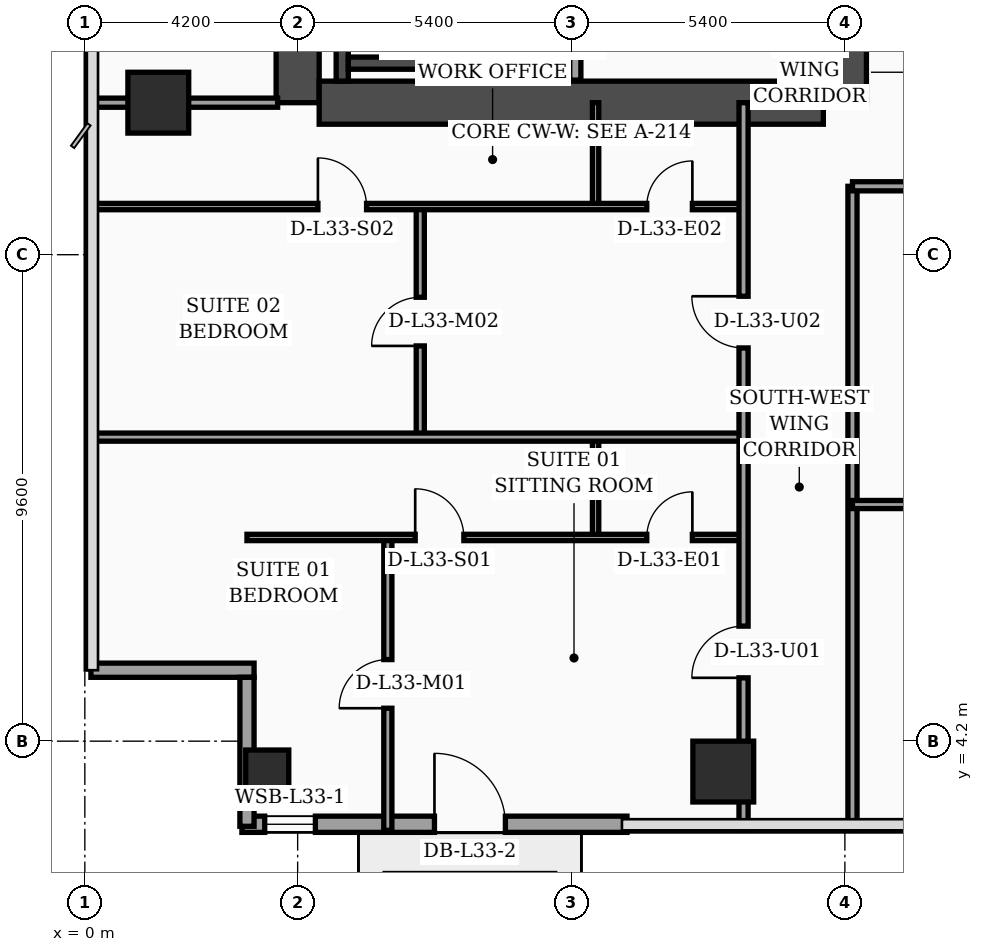
"""IFC4 building model, lengths in metres.
Left out: names, types, materials, properties, quantities, classifications, styles, units other than length and angle.
Written with IfcOpenShell. Run it as: python <this file> out.ifc"""

import sys

from ifc_helpers import new_model, si_unit, direction, frame, frame_2d, origin, origin_2d, place, context, subcontext, project, spatial, rectangle, hollow_rectangle, extrude, element, fill, save


model = new_model("IFC4")
c1 = context("Model", 3, precision=1e-05, world=origin(), true_north=direction((0.0, 1.0)))
c2 = subcontext(c1, "Body", "Model", "MODEL_VIEW")
j1 = project(units=[si_unit("LENGTHUNIT", "METRE"), si_unit("PLANEANGLEUNIT", "RADIAN")], contexts=[c1])
p1 = place(None, origin())
s1 = spatial("IfcSite", under=j1, at=p1, CompositionType="ELEMENT")
p2 = place(p1, origin())
s2 = spatial("IfcBuilding", under=s1, at=p2, CompositionType="ELEMENT")
p3 = place(p2, frame((0.0, 0.0, 135.4)))
s3 = spatial("IfcBuildingStorey", under=s2, at=p3, CompositionType="ELEMENT", Elevation=135.4)
p4 = place(p3, frame((4.2, 16.8, 0.0), z_axis=(0.0, 0.0, 1.0), x_axis=(0.0, 1.0, 0.0)))
e1 = element("IfcWall", 1, at=p4, inside=s3, PredefinedType="SHEAR", context=c2, shape_type="SweptSolid", body=[
    extrude(rectangle(XDim=21.6, YDim=0.85, at=frame_2d((10.8, 0.0))), origin(), (0.0, 0.0, 1.0), 3.52),
])
p5 = place(p3, frame((15.0, 16.8, 0.0), z_axis=(0.0, 0.0, 1.0), x_axis=(0.0, 1.0, 0.0)))
e2 = element("IfcWall", 2, at=p5, inside=s3, PredefinedType="SHEAR", context=c2, shape_type="SweptSolid", body=[
    extrude(rectangle(XDim=21.6, YDim=0.85, at=frame_2d((10.8, 0.0))), origin(), (0.0, 0.0, 1.0), 3.52),
])
p6 = place(p5, frame((8.65, 0.0, 0.0)))
e3 = element("IfcOpeningElement", 3, at=p6, cuts=e2, PredefinedType="OPENING", context=c2, shape_type="SweptSolid", body=[
    extrude(rectangle(XDim=1.1, YDim=2.2, at=frame_2d((0.55, 1.1))), frame((0.0, 0.435, 0.0), z_axis=(0.0, -1.0, 0.0), x_axis=(1.0, 0.0, 0.0)), (0.0, 0.0, 1.0), 0.87),
])
p7 = place(p5, frame((10.85, 0.0, 0.0)))
e4 = element("IfcOpeningElement", 4, at=p7, cuts=e2, PredefinedType="OPENING", context=c2, shape_type="SweptSolid", body=[
    extrude(rectangle(XDim=1.1, YDim=2.2, at=frame_2d((0.55, 1.1))), frame((0.0, 0.435, 0.0), z_axis=(0.0, -1.0, 0.0), x_axis=(1.0, 0.0, 0.0)), (0.0, 0.0, 1.0), 0.87),
])
p8 = place(p5, frame((13.5, 0.0, 0.0)))
e5 = element("IfcOpeningElement", 5, at=p8, cuts=e2, PredefinedType="OPENING", context=c2, shape_type="SweptSolid", body=[
    extrude(rectangle(XDim=1.1, YDim=2.2, at=frame_2d((0.55, 1.1))), frame((0.0, 0.435, 0.0), z_axis=(0.0, -1.0, 0.0), x_axis=(1.0, 0.0, 0.0)), (0.0, 0.0, 1.0), 0.87),
])
p9 = place(p5, frame((16.15, 0.0, 0.0)))
e6 = element("IfcOpeningElement", 6, at=p9, cuts=e2, PredefinedType="OPENING", context=c2, shape_type="SweptSolid", body=[
    extrude(rectangle(XDim=1.1, YDim=2.2, at=frame_2d((0.55, 1.1))), frame((0.0, 0.435, 0.0), z_axis=(0.0, -1.0, 0.0), x_axis=(1.0, 0.0, 0.0)), (0.0, 0.0, 1.0), 0.87),
])
p10 = place(p3, frame((4.625, 16.8, 0.0), z_axis=(0.0, 0.0, 1.0), x_axis=(1.0, 0.0, 0.0)))
e7 = element("IfcWall", 7, at=p10, inside=s3, PredefinedType="SHEAR", context=c2, shape_type="SweptSolid", body=[
    extrude(rectangle(XDim=9.95, YDim=0.85, at=frame_2d((4.975, 0.0))), origin(), (0.0, 0.0, 1.0), 3.52),
])
p11 = place(p3, frame((5.08, 17.225, 0.0), z_axis=(0.0, 0.0, 1.0), x_axis=(0.0, 1.0, 0.0)))
e8 = element("IfcWall", 8, at=p11, inside=s3, PredefinedType="SOLIDWALL", context=c2, shape_type="SweptSolid", body=[
    extrude(rectangle(XDim=9.565, YDim=0.24, at=frame_2d((4.782, 0.0))), origin(), (0.0, 0.0, 1.0), 3.52),
])
p12 = place(p3, frame((8.42, 17.225, 0.0), z_axis=(0.0, 0.0, 1.0), x_axis=(0.0, 1.0, 0.0)))
e9 = element("IfcWall", 9, at=p12, inside=s3, PredefinedType="SOLIDWALL", context=c2, shape_type="SweptSolid", body=[
    extrude(rectangle(XDim=9.565, YDim=0.24, at=frame_2d((4.782, 0.0))), origin(), (0.0, 0.0, 1.0), 3.52),
])
p13 = place(p12, frame((0.35, 0.0, 0.0)))
e10 = element("IfcOpeningElement", 10, at=p13, cuts=e9, PredefinedType="OPENING", context=c2, shape_type="SweptSolid", body=[
    extrude(rectangle(XDim=1.15, YDim=2.2, at=frame_2d((0.575, 1.1))), frame((0.0, 0.13, 0.0), z_axis=(0.0, -1.0, 0.0), x_axis=(1.0, 0.0, 0.0)), (0.0, 0.0, 1.0), 0.26),
])
p14 = place(p3, frame((5.2, 17.58, 0.0), z_axis=(0.0, 0.0, 1.0), x_axis=(1.0, 0.0, 0.0)))
e11 = element("IfcWall", 11, at=p14, inside=s3, PredefinedType="SOLIDWALL", context=c2, shape_type="SweptSolid", body=[
    extrude(rectangle(XDim=3.1, YDim=0.24, at=frame_2d((1.55, 0.0))), origin(), (0.0, 0.0, 1.0), 3.52),
])
p15 = place(p3, frame((3.6, 3.6, 0.0), z_axis=(0.0, 0.0, 1.0), x_axis=(1.0, 0.0, 0.0)))
e12 = element("IfcColumn", 12, at=p15, inside=s3, PredefinedType="COLUMN", context=c2, shape_type="SweptSolid", body=[
    extrude(hollow_rectangle(XDim=0.85, YDim=0.85, WallThickness=0.036, at=origin_2d()), origin(), (0.0, 0.0, 1.0), 3.52),
])
for number, where, z_axis, x_axis in (
    (13, (1.45, 16.8, 0.0), (0.0, 0.0, 1.0), (1.0, 0.0, 0.0)),
    (14, (12.6, 3.6, 0.0), (0.0, 0.0, 1.0), (1.0, 0.0, 0.0)),
):
    element("IfcColumn", number, at=place(p3, frame(where, z_axis=z_axis, x_axis=x_axis)), inside=s3, PredefinedType="COLUMN", context=c2, shape_type="SweptSolid", body=[
        extrude(rectangle(XDim=1.2, YDim=1.2, at=origin_2d()), origin(), (0.0, 0.0, 1.0), 3.52),
    ])
p16 = place(p3, frame((3.1, 2.56, 0.0), z_axis=(0.0, 0.0, 1.0), x_axis=(1.0, 0.0, 0.0)))
e15 = element("IfcWall", 15, at=p16, inside=s3, PredefinedType="SOLIDWALL", context=c2, shape_type="SweptSolid", body=[
    extrude(rectangle(XDim=7.6, YDim=0.32, at=frame_2d((3.8, 0.0))), origin(), (0.0, 0.0, 1.0), 3.52),
])
p17 = place(p16, frame((0.45, 0.0, 0.75)))
e16 = element("IfcOpeningElement", 16, at=p17, cuts=e15, PredefinedType="OPENING", context=c2, shape_type="SweptSolid", body=[
    extrude(rectangle(XDim=1.0, YDim=1.6, at=frame_2d((0.5, 0.8))), frame((0.0, 0.17, 0.0), z_axis=(0.0, -1.0, 0.0), x_axis=(1.0, 0.0, 0.0)), (0.0, 0.0, 1.0), 0.34),
])
p18 = place(p16, frame((3.8, 0.0, 0.0)))
e17 = element("IfcOpeningElement", 17, at=p18, cuts=e15, PredefinedType="OPENING", context=c2, shape_type="SweptSolid", body=[
    extrude(rectangle(XDim=1.4, YDim=2.25, at=frame_2d((0.7, 1.125))), frame((0.0, 0.17, 0.0), z_axis=(0.0, -1.0, 0.0), x_axis=(1.0, 0.0, 0.0)), (0.0, 0.0, 1.0), 0.34),
])
p19 = place(p3, frame((0.12, 5.6, 0.0), z_axis=(0.0, 0.0, 1.0), x_axis=(1.0, 0.0, 0.0)))
e18 = element("IfcWall", 18, at=p19, inside=s3, PredefinedType="SOLIDWALL", context=c2, shape_type="SweptSolid", body=[
    extrude(rectangle(XDim=3.22, YDim=0.28, at=frame_2d((1.61, 0.0))), origin(), (0.0, 0.0, 1.0), 2.82),
])
p20 = place(p3, frame((3.2, 5.46, 0.0), z_axis=(0.0, 0.0, 1.0), x_axis=(0.0, -1.0, 0.0)))
e19 = element("IfcWall", 19, at=p20, inside=s3, PredefinedType="SOLIDWALL", context=c2, shape_type="SweptSolid", body=[
    extrude(rectangle(XDim=2.94, YDim=0.28, at=frame_2d((1.47, 0.0))), origin(), (0.0, 0.0, 1.0), 2.82),
])
p21 = place(p3, frame((9.68, 17.245, 0.0), z_axis=(0.0, 0.0, 1.0), x_axis=(0.0, 1.0, 0.0)))
e20 = element("IfcWall", 20, at=p21, inside=s3, PredefinedType="SOLIDWALL", context=c2, shape_type="SweptSolid", body=[
    extrude(rectangle(XDim=7.755, YDim=0.22, at=frame_2d((3.877, 0.0))), origin(), (0.0, 0.0, 1.0), 3.52),
])
p22 = place(p3, frame((0.08, 16.8, 0.0), z_axis=(0.0, 0.0, 1.0), x_axis=(1.0, 0.0, 0.0)))
e21 = element("IfcWall", 21, at=p22, inside=s3, PredefinedType="PARTITIONING", context=c2, shape_type="SweptSolid", body=[
    extrude(rectangle(XDim=3.725, YDim=0.18, at=frame_2d((1.862, 0.0))), origin(), (0.0, 0.0, 1.0), 2.82),
])
p23 = place(p3, frame((10.08, 8.22, 0.0), z_axis=(0.0, 0.0, 1.0), x_axis=(0.0, 1.0, 0.0)))
e22 = element("IfcWall", 22, at=p23, inside=s3, PredefinedType="PARTITIONING", context=c2, shape_type="SweptSolid", body=[
    extrude(rectangle(XDim=1.98, YDim=0.125, at=frame_2d((0.99, 0.0))), origin(), (0.0, 0.0, 1.0), 3.12),
])
p24 = place(p3, frame((5.98, 2.44, 0.0), z_axis=(0.0, 0.0, 1.0), x_axis=(0.0, 1.0, 0.0)))
e23 = element("IfcWall", 23, at=p24, inside=s3, PredefinedType="PARTITIONING", context=c2, shape_type="SweptSolid", body=[
    extrude(rectangle(XDim=5.78, YDim=0.16, at=frame_2d((2.89, 0.0))), origin(), (0.0, 0.0, 1.0), 3.02),
])
p25 = place(p24, frame((2.41, 0.0, 0.0)))
e24 = element("IfcOpeningElement", 24, at=p25, cuts=e23, PredefinedType="OPENING", context=c2, shape_type="SweptSolid", body=[
    extrude(rectangle(XDim=0.96, YDim=2.2, at=frame_2d((0.48, 1.1))), frame((0.0, 0.09, 0.0), z_axis=(0.0, -1.0, 0.0), x_axis=(1.0, 0.0, 0.0)), (0.0, 0.0, 1.0), 0.18),
])
p26 = place(p3, frame((3.2, 8.22, 0.0), z_axis=(0.0, 0.0, 1.0), x_axis=(1.0, 0.0, 0.0)))
e25 = element("IfcWall", 25, at=p26, inside=s3, PredefinedType="PARTITIONING", context=c2, shape_type="SweptSolid", body=[
    extrude(rectangle(XDim=9.8, YDim=0.125, at=frame_2d((4.9, 0.0))), origin(), (0.0, 0.0, 1.0), 2.82),
])
p27 = place(p26, frame((3.32, 0.0, 0.0)))
e26 = element("IfcOpeningElement", 26, at=p27, cuts=e25, PredefinedType="OPENING", context=c2, shape_type="SweptSolid", body=[
    extrude(rectangle(XDim=0.96, YDim=2.2, at=frame_2d((0.48, 1.1))), frame((0.0, 0.073, 0.0), z_axis=(0.0, -1.0, 0.0), x_axis=(1.0, 0.0, 0.0)), (0.0, 0.0, 1.0), 0.145),
])
p28 = place(p26, frame((7.89, 0.0, 0.0)))
e27 = element("IfcOpeningElement", 27, at=p28, cuts=e25, PredefinedType="OPENING", context=c2, shape_type="SweptSolid", body=[
    extrude(rectangle(XDim=0.9, YDim=2.15, at=frame_2d((0.45, 1.075))), frame((0.0, 0.073, 0.0), z_axis=(0.0, -1.0, 0.0), x_axis=(1.0, 0.0, 0.0)), (0.0, 0.0, 1.0), 0.145),
])
p29 = place(p3, frame((10.08, 14.75, 0.0), z_axis=(0.0, 0.0, 1.0), x_axis=(0.0, 1.0, 0.0)))
e28 = element("IfcWall", 28, at=p29, inside=s3, PredefinedType="PARTITIONING", context=c2, shape_type="SweptSolid", body=[
    extrude(rectangle(XDim=2.05, YDim=0.125, at=frame_2d((1.025, 0.0))), origin(), (0.0, 0.0, 1.0), 3.52),
])
p30 = place(p3, frame((6.62, 10.2, 0.0), z_axis=(0.0, 0.0, 1.0), x_axis=(0.0, 1.0, 0.0)))
e29 = element("IfcWall", 29, at=p30, inside=s3, PredefinedType="PARTITIONING", context=c2, shape_type="SweptSolid", body=[
    extrude(rectangle(XDim=4.55, YDim=0.16, at=frame_2d((2.275, 0.0))), origin(), (0.0, 0.0, 1.0), 3.12),
])
p31 = place(p30, frame((1.8, 0.0, 0.0)))
e30 = element("IfcOpeningElement", 30, at=p31, cuts=e29, PredefinedType="OPENING", context=c2, shape_type="SweptSolid", body=[
    extrude(rectangle(XDim=0.96, YDim=2.2, at=frame_2d((0.48, 1.1))), frame((0.0, 0.09, 0.0), z_axis=(0.0, -1.0, 0.0), x_axis=(1.0, 0.0, 0.0)), (0.0, 0.0, 1.0), 0.18),
])
p32 = place(p3, frame((0.08, 14.75, 0.0), z_axis=(0.0, 0.0, 1.0), x_axis=(1.0, 0.0, 0.0)))
e31 = element("IfcWall", 31, at=p32, inside=s3, PredefinedType="PARTITIONING", context=c2, shape_type="SweptSolid", body=[
    extrude(rectangle(XDim=12.92, YDim=0.125, at=frame_2d((6.46, 0.0))), origin(), (0.0, 0.0, 1.0), 2.82),
])
p33 = place(p32, frame((4.52, 0.0, 0.0)))
e32 = element("IfcOpeningElement", 32, at=p33, cuts=e31, PredefinedType="OPENING", context=c2, shape_type="SweptSolid", body=[
    extrude(rectangle(XDim=0.96, YDim=2.2, at=frame_2d((0.48, 1.1))), frame((0.0, 0.073, 0.0), z_axis=(0.0, -1.0, 0.0), x_axis=(1.0, 0.0, 0.0)), (0.0, 0.0, 1.0), 0.145),
])
p34 = place(p32, frame((11.01, 0.0, 0.0)))
e33 = element("IfcOpeningElement", 33, at=p34, cuts=e31, PredefinedType="OPENING", context=c2, shape_type="SweptSolid", body=[
    extrude(rectangle(XDim=0.9, YDim=2.15, at=frame_2d((0.45, 1.075))), frame((0.0, 0.073, 0.0), z_axis=(0.0, -1.0, 0.0), x_axis=(1.0, 0.0, 0.0)), (0.0, 0.0, 1.0), 0.145),
])
p35 = place(p3, frame((0.08, 10.2, 0.0), z_axis=(0.0, 0.0, 1.0), x_axis=(1.0, 0.0, 0.0)))
e34 = element("IfcWall", 34, at=p35, inside=s3, PredefinedType="PARTITIONING", context=c2, shape_type="SweptSolid", body=[
    extrude(rectangle(XDim=12.92, YDim=0.16, at=frame_2d((6.46, 0.0))), origin(), (0.0, 0.0, 1.0), 2.82),
])
p36 = place(p3, frame((13.0, 2.44, 0.0), z_axis=(0.0, 0.0, 1.0), x_axis=(0.0, 1.0, 0.0)))
e35 = element("IfcWall", 35, at=p36, inside=s3, PredefinedType="PARTITIONING", context=c2, shape_type="SweptSolid", body=[
    extrude(rectangle(XDim=14.36, YDim=0.18, at=frame_2d((7.18, 0.0))), origin(), (0.0, 0.0, 1.0), 2.82),
])
p37 = place(p36, frame((3.01, 0.0, 0.0)))
e36 = element("IfcOpeningElement", 36, at=p37, cuts=e35, PredefinedType="OPENING", context=c2, shape_type="SweptSolid", body=[
    extrude(rectangle(XDim=1.02, YDim=2.2, at=frame_2d((0.51, 1.1))), frame((0.0, 0.1, 0.0), z_axis=(0.0, -1.0, 0.0), x_axis=(1.0, 0.0, 0.0)), (0.0, 0.0, 1.0), 0.2),
])
p38 = place(p36, frame((9.52, 0.0, 0.0)))
e37 = element("IfcOpeningElement", 37, at=p38, cuts=e35, PredefinedType="OPENING", context=c2, shape_type="SweptSolid", body=[
    extrude(rectangle(XDim=1.02, YDim=2.2, at=frame_2d((0.51, 1.1))), frame((0.0, 0.1, 0.0), z_axis=(0.0, -1.0, 0.0), x_axis=(1.0, 0.0, 0.0)), (0.0, 0.0, 1.0), 0.2),
])
p39 = place(p3, frame((15.15, 2.44, 0.0), z_axis=(0.0, 0.0, 1.0), x_axis=(0.0, 1.0, 0.0)))
e38 = element("IfcWall", 38, at=p39, inside=s3, PredefinedType="PARTITIONING", context=c2, shape_type="SweptSolid", body=[
    extrude(rectangle(XDim=12.71, YDim=0.18, at=frame_2d((6.355, 0.0))), origin(), (0.0, 0.0, 1.0), 3.02),
])
p40 = place(p3, frame((15.15, 8.87, 0.0), z_axis=(0.0, 0.0, 1.0), x_axis=(1.0, 0.0, 0.0)))
e39 = element("IfcWall", 39, at=p40, inside=s3, PredefinedType="PARTITIONING", context=c2, shape_type="SweptSolid", body=[
    extrude(rectangle(XDim=4.45, YDim=0.16, at=frame_2d((2.225, 0.0))), origin(), (0.0, 0.0, 1.0), 3.52),
])
p41 = place(p40, frame((1.75, 0.0, 0.0)))
e40 = element("IfcOpeningElement", 40, at=p41, cuts=e39, PredefinedType="OPENING", context=c2, shape_type="SweptSolid", body=[
    extrude(rectangle(XDim=0.96, YDim=2.2, at=frame_2d((0.48, 1.1))), frame((0.0, 0.09, 0.0), z_axis=(0.0, -1.0, 0.0), x_axis=(1.0, 0.0, 0.0)), (0.0, 0.0, 1.0), 0.18),
])
p42 = place(p3, frame((15.15, 15.15, 0.0), z_axis=(0.0, 0.0, 1.0), x_axis=(1.0, 0.0, 0.0)))
e41 = element("IfcWall", 41, at=p42, inside=s3, PredefinedType="PARTITIONING", context=c2, shape_type="SweptSolid", body=[
    extrude(rectangle(XDim=6.45, YDim=0.18, at=frame_2d((3.225, 0.0))), origin(), (0.0, 0.0, 1.0), 2.47),
])
p43 = place(p42, frame((1.74, 0.0, 0.0)))
e42 = element("IfcOpeningElement", 42, at=p43, cuts=e41, PredefinedType="OPENING", context=c2, shape_type="SweptSolid", body=[
    extrude(rectangle(XDim=1.02, YDim=2.2, at=frame_2d((0.51, 1.1))), frame((0.0, 0.1, 0.0), z_axis=(0.0, -1.0, 0.0), x_axis=(1.0, 0.0, 0.0)), (0.0, 0.0, 1.0), 0.2),
])
p44 = place(p17, origin())
e43 = element("IfcWindow", 43, at=p44, inside=s3, PartitioningType="SINGLE_PANEL", PredefinedType="WINDOW", context=c2, shape_type="SweptSolid", body=[
    extrude(rectangle(XDim=1.0, YDim=1.6, at=frame_2d((0.5, 0.8))), frame((0.0, 0.03, 0.0), z_axis=(0.0, -1.0, 0.0), x_axis=(1.0, 0.0, 0.0)), (0.0, 0.0, 1.0), 0.06),
])
fill(e16, e43)
p45 = place(p18, origin())
e44 = element("IfcDoor", 44, at=p45, inside=s3, OperationType="SINGLE_SWING_LEFT", PredefinedType="DOOR", context=c2, shape_type="SweptSolid", body=[
    extrude(rectangle(XDim=1.4, YDim=2.25, at=frame_2d((0.7, 1.125))), frame((0.0, 0.025, 0.0), z_axis=(0.0, -1.0, 0.0), x_axis=(1.0, 0.0, 0.0)), (0.0, 0.0, 1.0), 0.05),
])
fill(e17, e44)
p46 = place(p25, origin())
e45 = element("IfcDoor", 45, at=p46, inside=s3, OperationType="SINGLE_SWING_LEFT", PredefinedType="DOOR", context=c2, shape_type="SweptSolid", body=[
    extrude(rectangle(XDim=0.96, YDim=2.2, at=frame_2d((0.48, 1.1))), frame((0.0, 0.025, 0.0), z_axis=(0.0, -1.0, 0.0), x_axis=(1.0, 0.0, 0.0)), (0.0, 0.0, 1.0), 0.05),
])
fill(e24, e45)
p47 = place(p27, origin())
e46 = element("IfcDoor", 46, at=p47, inside=s3, OperationType="SINGLE_SWING_LEFT", PredefinedType="DOOR", context=c2, shape_type="SweptSolid", body=[
    extrude(rectangle(XDim=0.96, YDim=2.2, at=frame_2d((0.48, 1.1))), frame((0.0, 0.025, 0.0), z_axis=(0.0, -1.0, 0.0), x_axis=(1.0, 0.0, 0.0)), (0.0, 0.0, 1.0), 0.05),
])
fill(e26, e46)
p48 = place(p28, origin())
e47 = element("IfcDoor", 47, at=p48, inside=s3, OperationType="SINGLE_SWING_RIGHT", PredefinedType="DOOR", context=c2, shape_type="SweptSolid", body=[
    extrude(rectangle(XDim=0.9, YDim=2.15, at=frame_2d((0.45, 1.075))), frame((0.0, 0.025, 0.0), z_axis=(0.0, -1.0, 0.0), x_axis=(1.0, 0.0, 0.0)), (0.0, 0.0, 1.0), 0.05),
])
fill(e27, e47)
p49 = place(p31, origin())
e48 = element("IfcDoor", 48, at=p49, inside=s3, OperationType="SINGLE_SWING_LEFT", PredefinedType="DOOR", context=c2, shape_type="SweptSolid", body=[
    extrude(rectangle(XDim=0.96, YDim=2.2, at=frame_2d((0.48, 1.1))), frame((0.0, 0.025, 0.0), z_axis=(0.0, -1.0, 0.0), x_axis=(1.0, 0.0, 0.0)), (0.0, 0.0, 1.0), 0.05),
])
fill(e30, e48)
p50 = place(p33, origin())
e49 = element("IfcDoor", 49, at=p50, inside=s3, OperationType="SINGLE_SWING_LEFT", PredefinedType="DOOR", context=c2, shape_type="SweptSolid", body=[
    extrude(rectangle(XDim=0.96, YDim=2.2, at=frame_2d((0.48, 1.1))), frame((0.0, 0.025, 0.0), z_axis=(0.0, -1.0, 0.0), x_axis=(1.0, 0.0, 0.0)), (0.0, 0.0, 1.0), 0.05),
])
fill(e32, e49)
p51 = place(p34, origin())
e50 = element("IfcDoor", 50, at=p51, inside=s3, OperationType="SINGLE_SWING_RIGHT", PredefinedType="DOOR", context=c2, shape_type="SweptSolid", body=[
    extrude(rectangle(XDim=0.9, YDim=2.15, at=frame_2d((0.45, 1.075))), frame((0.0, 0.025, 0.0), z_axis=(0.0, -1.0, 0.0), x_axis=(1.0, 0.0, 0.0)), (0.0, 0.0, 1.0), 0.05),
])
fill(e33, e50)
p52 = place(p37, origin())
e51 = element("IfcDoor", 51, at=p52, inside=s3, OperationType="SINGLE_SWING_LEFT", PredefinedType="DOOR", context=c2, shape_type="SweptSolid", body=[
    extrude(rectangle(XDim=1.02, YDim=2.2, at=frame_2d((0.51, 1.1))), frame((0.0, 0.025, 0.0), z_axis=(0.0, -1.0, 0.0), x_axis=(1.0, 0.0, 0.0)), (0.0, 0.0, 1.0), 0.05),
])
fill(e36, e51)
p53 = place(p38, origin())
e52 = element("IfcDoor", 52, at=p53, inside=s3, OperationType="SINGLE_SWING_RIGHT", PredefinedType="DOOR", context=c2, shape_type="SweptSolid", body=[
    extrude(rectangle(XDim=1.02, YDim=2.2, at=frame_2d((0.51, 1.1))), frame((0.0, 0.025, 0.0), z_axis=(0.0, -1.0, 0.0), x_axis=(1.0, 0.0, 0.0)), (0.0, 0.0, 1.0), 0.05),
])
fill(e37, e52)
p54 = place(p13, origin())
e53 = element("IfcDoor", 53, at=p54, inside=s3, OperationType="SINGLE_SWING_LEFT", PredefinedType="DOOR", context=c2, shape_type="SweptSolid", body=[
    extrude(rectangle(XDim=1.15, YDim=2.2, at=frame_2d((0.575, 1.1))), frame((0.0, 0.025, 0.0), z_axis=(0.0, -1.0, 0.0), x_axis=(1.0, 0.0, 0.0)), (0.0, 0.0, 1.0), 0.05),
])
fill(e10, e53)
save(model, sys.argv[1])
